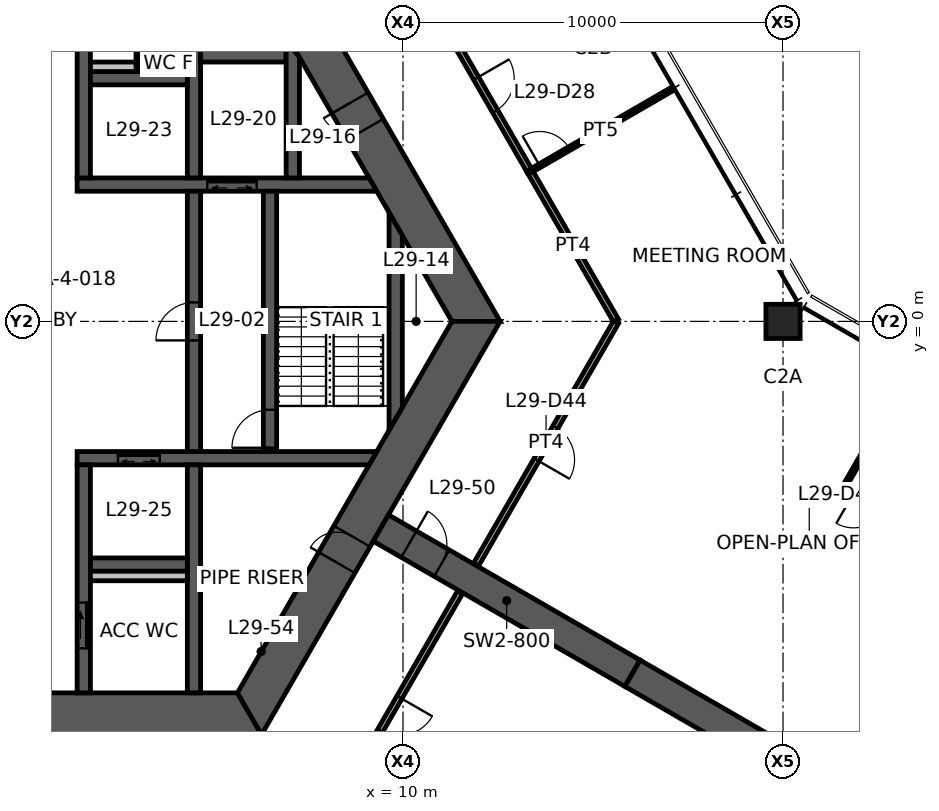
"""IFC4 building model, lengths in metres.
Left out: names, types, materials, properties, quantities, classifications, styles, units other than length and angle.
Written with IfcOpenShell. Run it as: python <this file> out.ifc"""

import sys

from ifc_helpers import new_model, si_unit, direction, frame, frame_2d, origin, origin_2d, place, context, subcontext, project, spatial, polyline, rectangle, hollow_rectangle, outline, extrude, element, fill, save


model = new_model("IFC4")
c1 = context("Model", 3, precision=1e-05, world=origin(), true_north=direction((0.0, 1.0)))
c2 = subcontext(c1, "Body", "Model", "MODEL_VIEW")
j1 = project(units=[si_unit("LENGTHUNIT", "METRE"), si_unit("PLANEANGLEUNIT", "RADIAN")], contexts=[c1])
p1 = place(None, origin())
s1 = spatial("IfcSite", under=j1, at=p1, CompositionType="ELEMENT")
p2 = place(p1, origin())
s2 = spatial("IfcBuilding", under=s1, at=p2, CompositionType="ELEMENT")
p3 = place(p2, frame((0.0, 0.0, 115.8)))
s3 = spatial("IfcBuildingStorey", under=s2, at=p3, CompositionType="ELEMENT", Elevation=115.8)
p4 = place(p3, frame((20.0, 0.0, 0.0), z_axis=(0.0, 0.0, 1.0), x_axis=(1.0, 0.0, 0.0)))
e1 = element("IfcColumn", 1, at=p4, inside=s3, PredefinedType="COLUMN", context=c2, shape_type="SweptSolid", body=[
    extrude(hollow_rectangle(XDim=0.9, YDim=0.9, WallThickness=0.055, at=origin_2d()), origin(), (0.0, 0.0, 1.0), 3.9),
])
p5 = place(p3, frame((11.922, 0.0, 0.0), z_axis=(0.0, 0.0, 1.0), x_axis=(-0.500004296715, 0.866022923061, 0.0)))
e2 = element("IfcWall", 2, at=p5, inside=s3, PredefinedType="SHEAR", context=c2, shape_type="SweptSolid", body=[
    extrude(outline(polyline([(-0.318, -0.55), (5.835, -0.55), (6.635, -0.55), (12.24, -0.55), (11.605, 0.55), (6.635, 0.55), (5.835, 0.55), (0.318, 0.55), (-0.318, -0.55)])), origin(), (0.0, 0.0, 1.0), 3.9),
])
p6 = place(p5, frame((5.835, 0.0, 0.0)))
e3 = element("IfcOpeningElement", 3, at=p6, cuts=e2, PredefinedType="OPENING", context=c2, shape_type="SweptSolid", body=[
    extrude(rectangle(XDim=0.8, YDim=2.1, at=frame_2d((0.4, 1.05))), frame((0.0, 0.56, 0.0), z_axis=(0.0, -1.0, 0.0), x_axis=(1.0, 0.0, 0.0)), (0.0, 0.0, 1.0), 1.12),
])
p7 = place(p3, frame((-5.961, -10.325, 0.0), z_axis=(0.0, 0.0, 1.0), x_axis=(1.0, 0.0, 0.0)))
e4 = element("IfcWall", 4, at=p7, inside=s3, PredefinedType="SHEAR", context=c2, shape_type="SweptSolid", body=[
    extrude(outline(polyline([(-0.318, -0.55), (5.461, -0.55), (6.461, -0.55), (12.24, -0.55), (11.605, 0.55), (6.461, 0.55), (5.461, 0.55), (0.318, 0.55), (-0.318, -0.55)])), origin(), (0.0, 0.0, 1.0), 3.9),
])
p8 = place(p7, frame((5.461, 0.0, 0.0)))
e5 = element("IfcOpeningElement", 5, at=p8, cuts=e4, PredefinedType="OPENING", context=c2, shape_type="SweptSolid", body=[
    extrude(rectangle(XDim=1.0, YDim=2.1, at=frame_2d((0.5, 1.05))), frame((0.0, 0.56, 0.0), z_axis=(0.0, -1.0, 0.0), x_axis=(1.0, 0.0, 0.0)), (0.0, 0.0, 1.0), 1.12),
])
p9 = place(p3, frame((5.961, -10.325, 0.0), z_axis=(0.0, 0.0, 1.0), x_axis=(0.500004296715, 0.866022923061, 0.0)))
e6 = element("IfcWall", 6, at=p9, inside=s3, PredefinedType="SHEAR", context=c2, shape_type="SweptSolid", body=[
    extrude(outline(polyline([(-0.318, -0.55), (4.594, -0.55), (5.394, -0.55), (12.24, -0.55), (11.605, 0.55), (5.394, 0.55), (4.594, 0.55), (0.318, 0.55), (-0.318, -0.55)])), origin(), (0.0, 0.0, 1.0), 3.9),
])
p10 = place(p9, frame((4.594, 0.0, 0.0)))
e7 = element("IfcOpeningElement", 7, at=p10, cuts=e6, PredefinedType="OPENING", context=c2, shape_type="SweptSolid", body=[
    extrude(rectangle(XDim=0.8, YDim=2.1, at=frame_2d((0.4, 1.05))), frame((0.0, 0.56, 0.0), z_axis=(0.0, -1.0, 0.0), x_axis=(1.0, 0.0, 0.0)), (0.0, 0.0, 1.0), 1.12),
])
p11 = place(p3, frame((9.418, -5.438, 0.0), z_axis=(0.0, 0.0, 1.0), x_axis=(0.866029782078, -0.499992416496, 0.0)))
e8 = element("IfcWall", 8, at=p11, inside=s3, PredefinedType="SHEAR", context=c2, shape_type="SweptSolid", body=[
    extrude(rectangle(XDim=7.646, YDim=0.8, at=frame_2d((3.823, 0.0))), origin(), (0.0, 0.0, 1.0), 3.9),
])
p12 = place(p11, frame((0.85, 0.0, 0.0)))
e9 = element("IfcOpeningElement", 9, at=p12, cuts=e8, PredefinedType="OPENING", context=c2, shape_type="SweptSolid", body=[
    extrude(rectangle(XDim=1.0, YDim=2.1, at=frame_2d((0.5, 1.05))), frame((0.0, 0.41, 0.0), z_axis=(0.0, -1.0, 0.0), x_axis=(1.0, 0.0, 0.0)), (0.0, 0.0, 1.0), 0.82),
])
p13 = place(p3, frame((16.039, -9.26, 0.0), z_axis=(0.0, 0.0, 1.0), x_axis=(0.866024837091, -0.50000098154, 0.0)))
e10 = element("IfcWall", 10, at=p13, inside=s3, PredefinedType="SHEAR", context=c2, shape_type="SweptSolid", body=[
    extrude(rectangle(XDim=13.0, YDim=0.8, at=frame_2d((6.5, 0.0))), origin(), (0.0, 0.0, 1.0), 3.9),
])
p14 = place(p3, frame((1.425, 3.6, 0.0), z_axis=(0.0, 0.0, 1.0), x_axis=(1.0, 0.0, 0.0)))
e11 = element("IfcWall", 11, at=p14, inside=s3, PredefinedType="SHEAR", context=c2, shape_type="SweptSolid", body=[
    extrude(outline(polyline([(0.0, -0.175), (3.425, -0.175), (4.725, -0.175), (7.885, -0.175), (7.683, 0.175), (4.725, 0.175), (3.425, 0.175), (0.0, 0.175), (0.0, -0.175)])), origin(), (0.0, 0.0, 1.0), 3.9),
])
p15 = place(p14, frame((3.425, 0.0, 0.0)))
e12 = element("IfcOpeningElement", 12, at=p15, cuts=e11, PredefinedType="OPENING", context=c2, shape_type="SweptSolid", body=[
    extrude(rectangle(XDim=1.3, YDim=2.1, at=frame_2d((0.65, 1.05))), frame((0.0, 0.185, 0.0), z_axis=(0.0, -1.0, 0.0), x_axis=(1.0, 0.0, 0.0)), (0.0, 0.0, 1.0), 0.37),
])
p16 = place(p3, frame((1.425, -3.6, 0.0), z_axis=(0.0, 0.0, 1.0), x_axis=(1.0, 0.0, 0.0)))
e13 = element("IfcWall", 13, at=p16, inside=s3, PredefinedType="SHEAR", context=c2, shape_type="SweptSolid", body=[
    extrude(outline(polyline([(0.0, -0.175), (1.075, -0.175), (2.175, -0.175), (7.683, -0.175), (7.885, 0.175), (2.175, 0.175), (1.075, 0.175), (0.0, 0.175), (0.0, -0.175)])), origin(), (0.0, 0.0, 1.0), 3.9),
])
p17 = place(p16, frame((1.075, 0.0, 0.0)))
e14 = element("IfcOpeningElement", 14, at=p17, cuts=e13, PredefinedType="OPENING", context=c2, shape_type="SweptSolid", body=[
    extrude(rectangle(XDim=1.1, YDim=2.1, at=frame_2d((0.55, 1.05))), frame((0.0, 0.185, 0.0), z_axis=(0.0, -1.0, 0.0), x_axis=(1.0, 0.0, 0.0)), (0.0, 0.0, 1.0), 0.37),
])
p18 = place(p3, frame((1.6, 3.775, 0.0), z_axis=(0.0, 0.0, 1.0), x_axis=(0.0, 1.0, 0.0)))
e15 = element("IfcWall", 15, at=p18, inside=s3, PredefinedType="SHEAR", context=c2, shape_type="SweptSolid", body=[
    extrude(rectangle(XDim=6.0, YDim=0.35, at=frame_2d((3.0, 0.0))), origin(), (0.0, 0.0, 1.0), 3.9),
])
p19 = place(p18, frame((3.775, 0.0, 0.0)))
e16 = element("IfcOpeningElement", 16, at=p19, cuts=e15, PredefinedType="OPENING", context=c2, shape_type="SweptSolid", body=[
    extrude(rectangle(XDim=0.9, YDim=2.1, at=frame_2d((0.45, 1.05))), frame((0.0, 0.185, 0.0), z_axis=(0.0, -1.0, 0.0), x_axis=(1.0, 0.0, 0.0)), (0.0, 0.0, 1.0), 0.37),
])
p20 = place(p3, frame((1.6, -3.775, 0.0), z_axis=(0.0, 0.0, 1.0), x_axis=(0.0, -1.0, 0.0)))
e17 = element("IfcWall", 17, at=p20, inside=s3, PredefinedType="SHEAR", context=c2, shape_type="SweptSolid", body=[
    extrude(rectangle(XDim=6.0, YDim=0.35, at=frame_2d((3.0, 0.0))), origin(), (0.0, 0.0, 1.0), 3.9),
])
p21 = place(p20, frame((3.625, 0.0, 0.0)))
e18 = element("IfcOpeningElement", 18, at=p21, cuts=e17, PredefinedType="OPENING", context=c2, shape_type="SweptSolid", body=[
    extrude(rectangle(XDim=1.2, YDim=2.1, at=frame_2d((0.6, 1.05))), frame((0.0, 0.185, 0.0), z_axis=(0.0, -1.0, 0.0), x_axis=(1.0, 0.0, 0.0)), (0.0, 0.0, 1.0), 0.37),
])
p22 = place(p3, frame((4.5, -3.425, 0.0), z_axis=(0.0, 0.0, 1.0), x_axis=(0.0, 1.0, 0.0)))
e19 = element("IfcWall", 19, at=p22, inside=s3, PredefinedType="SHEAR", context=c2, shape_type="SweptSolid", body=[
    extrude(rectangle(XDim=6.85, YDim=0.35, at=frame_2d((3.425, 0.0))), origin(), (0.0, 0.0, 1.0), 3.9),
])
p23 = place(p22, frame((2.925, 0.0, 0.0)))
e20 = element("IfcOpeningElement", 20, at=p23, cuts=e19, PredefinedType="OPENING", context=c2, shape_type="SweptSolid", body=[
    extrude(rectangle(XDim=1.0, YDim=2.1, at=frame_2d((0.5, 1.05))), frame((0.0, 0.185, 0.0), z_axis=(0.0, -1.0, 0.0), x_axis=(1.0, 0.0, 0.0)), (0.0, 0.0, 1.0), 0.37),
])
p24 = place(p3, frame((6.5, -3.425, 0.0), z_axis=(0.0, 0.0, 1.0), x_axis=(0.0, 1.0, 0.0)))
e21 = element("IfcWall", 21, at=p24, inside=s3, PredefinedType="SHEAR", context=c2, shape_type="SweptSolid", body=[
    extrude(rectangle(XDim=6.85, YDim=0.35, at=frame_2d((3.425, 0.0))), origin(), (0.0, 0.0, 1.0), 3.9),
])
p25 = place(p24, frame((0.1, 0.0, 0.0)))
e22 = element("IfcOpeningElement", 22, at=p25, cuts=e21, PredefinedType="OPENING", context=c2, shape_type="SweptSolid", body=[
    extrude(rectangle(XDim=1.0, YDim=2.1, at=frame_2d((0.5, 1.05))), frame((0.0, 0.185, 0.0), z_axis=(0.0, -1.0, 0.0), x_axis=(1.0, 0.0, 0.0)), (0.0, 0.0, 1.0), 0.37),
])
p26 = place(p3, frame((4.5, 3.775, 0.0), z_axis=(0.0, 0.0, 1.0), x_axis=(0.0, 1.0, 0.0)))
e23 = element("IfcWall", 23, at=p26, inside=s3, PredefinedType="SHEAR", context=c2, shape_type="SweptSolid", body=[
    extrude(rectangle(XDim=3.4, YDim=0.35, at=frame_2d((1.7, 0.0))), origin(), (0.0, 0.0, 1.0), 3.9),
])
p27 = place(p3, frame((4.5, -3.775, 0.0), z_axis=(0.0, 0.0, 1.0), x_axis=(0.0, -1.0, 0.0)))
e24 = element("IfcWall", 24, at=p27, inside=s3, PredefinedType="SHEAR", context=c2, shape_type="SweptSolid", body=[
    extrude(rectangle(XDim=6.0, YDim=0.35, at=frame_2d((3.0, 0.0))), origin(), (0.0, 0.0, 1.0), 3.9),
])
for number, where, z_axis, x_axis in (
    (25, (1.775, 6.4, 0.0), (0.0, 0.0, 1.0), (1.0, 0.0, 0.0)),
    (26, (1.775, -6.4, 0.0), (0.0, 0.0, 1.0), (1.0, 0.0, 0.0)),
):
    element("IfcWall", number, at=place(p3, frame(where, z_axis=z_axis, x_axis=x_axis)), inside=s3, PredefinedType="SHEAR", context=c2, shape_type="SweptSolid", body=[
        extrude(rectangle(XDim=2.55, YDim=0.35, at=frame_2d((1.275, 0.0))), origin(), (0.0, 0.0, 1.0), 3.9),
    ])
p28 = place(p3, frame((4.675, 7.0, 0.0), z_axis=(0.0, 0.0, 1.0), x_axis=(1.0, 0.0, 0.0)))
e27 = element("IfcWall", 27, at=p28, inside=s3, PredefinedType="SHEAR", context=c2, shape_type="SweptSolid", body=[
    extrude(rectangle(XDim=2.25, YDim=0.35, at=frame_2d((1.125, 0.0))), origin(), (0.0, 0.0, 1.0), 3.9),
])
p29 = place(p3, frame((7.1, 3.775, 0.0), z_axis=(0.0, 0.0, 1.0), x_axis=(0.0, 1.0, 0.0)))
e28 = element("IfcWall", 28, at=p29, inside=s3, PredefinedType="SHEAR", context=c2, shape_type="SweptSolid", body=[
    extrude(outline(polyline([(0.0, -0.175), (3.175, -0.175), (3.4, 0.0), (3.4, 0.175), (0.0, 0.175), (0.0, -0.175)])), origin(), (0.0, 0.0, 1.0), 3.9),
])
p30 = place(p3, frame((9.808, -2.562, 0.0), z_axis=(0.0, 0.0, 1.0), x_axis=(0.0, 1.0, 0.0)))
e29 = element("IfcWall", 29, at=p30, inside=s3, PredefinedType="SHEAR", context=c2, shape_type="SweptSolid", body=[
    extrude(outline(polyline([(0.303, -0.175), (4.821, -0.175), (5.428, 0.175), (-0.303, 0.175), (0.303, -0.175)])), origin(), (0.0, 0.0, 1.0), 3.9),
])
for number, where, z_axis, x_axis in (
    (30, (1.775, 6.7, 0.0), (0.0, 0.0, 1.0), (1.0, 0.0, 0.0)),
    (31, (1.775, -6.7, 0.0), (0.0, 0.0, 1.0), (1.0, 0.0, 0.0)),
):
    element("IfcWall", number, at=place(p3, frame(where, z_axis=z_axis, x_axis=x_axis)), inside=s3, PredefinedType="PLUMBINGWALL", context=c2, shape_type="SweptSolid", body=[
        extrude(rectangle(XDim=2.55, YDim=0.25, at=frame_2d((1.275, 0.0))), origin(), (0.0, 0.0, 1.0), 3.9),
    ])
p31 = place(p3, frame((3.025, 6.575, 0.0), z_axis=(0.0, 0.0, 1.0), x_axis=(0.0, 1.0, 0.0)))
e32 = element("IfcWall", 32, at=p31, inside=s3, PredefinedType="PARTITIONING", context=c2, shape_type="SweptSolid", body=[
    extrude(rectangle(XDim=3.2, YDim=0.1, at=frame_2d((1.6, 0.0))), origin(), (0.0, 0.0, 1.0), 2.95),
])
p32 = place(p31, frame((0.575, 0.0, 0.0)))
e33 = element("IfcOpeningElement", 33, at=p32, cuts=e32, PredefinedType="OPENING", context=c2, shape_type="SweptSolid", body=[
    extrude(rectangle(XDim=0.9, YDim=2.1, at=frame_2d((0.45, 1.05))), frame((0.0, 0.06, 0.0), z_axis=(0.0, -1.0, 0.0), x_axis=(1.0, 0.0, 0.0)), (0.0, 0.0, 1.0), 0.12),
])
p33 = place(p31, frame((2.1, 0.0, 0.0)))
e34 = element("IfcOpeningElement", 34, at=p33, cuts=e32, PredefinedType="OPENING", context=c2, shape_type="SweptSolid", body=[
    extrude(rectangle(XDim=0.9, YDim=2.1, at=frame_2d((0.45, 1.05))), frame((0.0, 0.06, 0.0), z_axis=(0.0, -1.0, 0.0), x_axis=(1.0, 0.0, 0.0)), (0.0, 0.0, 1.0), 0.12),
])
p34 = place(p3, frame((13.334, 3.955, 0.0), z_axis=(0.0, 0.0, 1.0), x_axis=(0.499987549055, -0.866032592222, 0.0)))
e35 = element("IfcWall", 35, at=p34, inside=s3, PredefinedType="PARTITIONING", context=c2, shape_type="SweptSolid", body=[
    extrude(rectangle(XDim=4.544, YDim=0.15, at=frame_2d((2.272, 0.0))), origin(), (0.0, 0.0, 1.0), 2.95),
])
p35 = place(p3, frame((11.011, 7.979, 0.0), z_axis=(0.0, 0.0, 1.0), x_axis=(0.500008456887, -0.866020521143, 0.0)))
e36 = element("IfcWall", 36, at=p35, inside=s3, PredefinedType="PARTITIONING", context=c2, shape_type="SweptSolid", body=[
    extrude(rectangle(XDim=4.655, YDim=0.15, at=frame_2d((2.328, 0.0))), origin(), (0.0, 0.0, 1.0), 2.95),
])
p36 = place(p35, frame((1.828, 0.0, 0.0)))
e37 = element("IfcOpeningElement", 37, at=p36, cuts=e36, PredefinedType="OPENING", context=c2, shape_type="SweptSolid", body=[
    extrude(rectangle(XDim=1.0, YDim=2.1, at=frame_2d((0.5, 1.05))), frame((0.0, 0.085, 0.0), z_axis=(0.0, -1.0, 0.0), x_axis=(1.0, 0.0, 0.0)), (0.0, 0.0, 1.0), 0.17),
])
p37 = place(p3, frame((13.338, 3.947, 0.0), z_axis=(0.0, 0.0, 1.0), x_axis=(0.865505397626, 0.500899597405, 0.0)))
e38 = element("IfcWall", 38, at=p37, inside=s3, PredefinedType="PARTITIONING", context=c2, shape_type="SweptSolid", body=[
    extrude(rectangle(XDim=4.295, YDim=0.1, at=frame_2d((2.148, 0.0))), origin(), (0.0, 0.0, 1.0), 2.95),
])
p38 = place(p37, frame((0.3, 0.0, 0.0)))
e39 = element("IfcOpeningElement", 39, at=p38, cuts=e38, PredefinedType="OPENING", context=c2, shape_type="SweptSolid", body=[
    extrude(rectangle(XDim=0.9, YDim=2.1, at=frame_2d((0.45, 1.05))), frame((0.0, 0.06, 0.0), z_axis=(0.0, -1.0, 0.0), x_axis=(1.0, 0.0, 0.0)), (0.0, 0.0, 1.0), 0.12),
])
p39 = place(p3, frame((15.606, -0.02, 0.0), z_axis=(0.0, 0.0, 1.0), x_axis=(-0.499989298045, -0.866031582473, 0.0)))
e40 = element("IfcWall", 40, at=p39, inside=s3, PredefinedType="PARTITIONING", context=c2, shape_type="SweptSolid", body=[
    extrude(rectangle(XDim=7.365, YDim=0.15, at=frame_2d((3.683, 0.0))), origin(), (0.0, 0.0, 1.0), 2.95),
])
p40 = place(p39, frame((3.183, 0.0, 0.0)))
e41 = element("IfcOpeningElement", 41, at=p40, cuts=e40, PredefinedType="OPENING", context=c2, shape_type="SweptSolid", body=[
    extrude(rectangle(XDim=1.0, YDim=2.1, at=frame_2d((0.5, 1.05))), frame((0.0, 0.085, 0.0), z_axis=(0.0, -1.0, 0.0), x_axis=(1.0, 0.0, 0.0)), (0.0, 0.0, 1.0), 0.17),
])
p41 = place(p3, frame((21.592, -4.383, 0.0), z_axis=(0.0, 0.0, 1.0), x_axis=(0.500009906705, 0.86601968407, 0.0)))
e42 = element("IfcWall", 42, at=p41, inside=s3, PredefinedType="PARTITIONING", context=c2, shape_type="SweptSolid", body=[
    extrude(rectangle(XDim=3.48, YDim=0.1, at=frame_2d((1.74, 0.0))), origin(), (0.0, 0.0, 1.0), 2.95),
])
p42 = place(p3, frame((27.327, -7.69, 0.0), z_axis=(0.0, 0.0, 1.0), x_axis=(-0.866318796728, 0.499491483847, 0.0)))
e43 = element("IfcWall", 43, at=p42, inside=s3, PredefinedType="PARTITIONING", context=c2, shape_type="SweptSolid", body=[
    extrude(rectangle(XDim=6.62, YDim=0.1, at=frame_2d((3.31, 0.0))), origin(), (0.0, 0.0, 1.0), 2.95),
])
p43 = place(p42, frame((5.42, 0.0, 0.0)))
e44 = element("IfcOpeningElement", 44, at=p43, cuts=e43, PredefinedType="OPENING", context=c2, shape_type="SweptSolid", body=[
    extrude(rectangle(XDim=0.9, YDim=2.1, at=frame_2d((0.45, 1.05))), frame((0.0, 0.06, 0.0), z_axis=(0.0, -1.0, 0.0), x_axis=(1.0, 0.0, 0.0)), (0.0, 0.0, 1.0), 0.12),
])
p44 = place(p3, frame((11.503, -7.126, 0.0), z_axis=(0.0, 0.0, 1.0), x_axis=(-0.500005620463, -0.866022158784, 0.0)))
e45 = element("IfcWall", 45, at=p44, inside=s3, PredefinedType="PARTITIONING", context=c2, shape_type="SweptSolid", body=[
    extrude(rectangle(XDim=7.389, YDim=0.15, at=frame_2d((3.694, 0.0))), origin(), (0.0, 0.0, 1.0), 2.95),
])
p45 = place(p44, frame((3.194, 0.0, 0.0)))
e46 = element("IfcOpeningElement", 46, at=p45, cuts=e45, PredefinedType="OPENING", context=c2, shape_type="SweptSolid", body=[
    extrude(rectangle(XDim=1.0, YDim=2.1, at=frame_2d((0.5, 1.05))), frame((0.0, 0.085, 0.0), z_axis=(0.0, -1.0, 0.0), x_axis=(1.0, 0.0, 0.0)), (0.0, 0.0, 1.0), 0.17),
])
p46 = place(p6, origin())
e47 = element("IfcDoor", 47, at=p46, inside=s3, OperationType="SINGLE_SWING_RIGHT", PredefinedType="DOOR", context=c2, shape_type="SweptSolid", body=[
    extrude(rectangle(XDim=0.8, YDim=2.1, at=frame_2d((0.4, 1.05))), frame((0.0, 0.025, 0.0), z_axis=(0.0, -1.0, 0.0), x_axis=(1.0, 0.0, 0.0)), (0.0, 0.0, 1.0), 0.05),
])
fill(e3, e47)
p47 = place(p10, origin())
e48 = element("IfcDoor", 48, at=p47, inside=s3, OperationType="SINGLE_SWING_LEFT", PredefinedType="DOOR", context=c2, shape_type="SweptSolid", body=[
    extrude(rectangle(XDim=0.8, YDim=2.1, at=frame_2d((0.4, 1.05))), frame((0.0, 0.025, 0.0), z_axis=(0.0, -1.0, 0.0), x_axis=(1.0, 0.0, 0.0)), (0.0, 0.0, 1.0), 0.05),
])
fill(e7, e48)
p48 = place(p23, origin())
e49 = element("IfcDoor", 49, at=p48, inside=s3, OperationType="SINGLE_SWING_LEFT", PredefinedType="DOOR", context=c2, shape_type="SweptSolid", body=[
    extrude(rectangle(XDim=1.0, YDim=2.1, at=frame_2d((0.5, 1.05))), frame((0.0, 0.025, 0.0), z_axis=(0.0, -1.0, 0.0), x_axis=(1.0, 0.0, 0.0)), (0.0, 0.0, 1.0), 0.05),
])
fill(e20, e49)
p49 = place(p25, origin())
e50 = element("IfcDoor", 50, at=p49, inside=s3, OperationType="SINGLE_SWING_LEFT", PredefinedType="DOOR", context=c2, shape_type="SweptSolid", body=[
    extrude(rectangle(XDim=1.0, YDim=2.1, at=frame_2d((0.5, 1.05))), frame((0.0, 0.025, 0.0), z_axis=(0.0, -1.0, 0.0), x_axis=(1.0, 0.0, 0.0)), (0.0, 0.0, 1.0), 0.05),
])
fill(e22, e50)
p50 = place(p21, origin())
e51 = element("IfcDoor", 51, at=p50, inside=s3, OperationType="SLIDING_TO_LEFT", PredefinedType="DOOR", context=c2, shape_type="SweptSolid", body=[
    extrude(rectangle(XDim=1.2, YDim=2.1, at=frame_2d((0.6, 1.05))), frame((0.0, 0.025, 0.0), z_axis=(0.0, -1.0, 0.0), x_axis=(1.0, 0.0, 0.0)), (0.0, 0.0, 1.0), 0.05),
])
fill(e18, e51)
p51 = place(p12, origin())
e52 = element("IfcDoor", 52, at=p51, inside=s3, OperationType="SINGLE_SWING_LEFT", PredefinedType="DOOR", context=c2, shape_type="SweptSolid", body=[
    extrude(rectangle(XDim=1.0, YDim=2.1, at=frame_2d((0.5, 1.05))), frame((0.0, 0.025, 0.0), z_axis=(0.0, -1.0, 0.0), x_axis=(1.0, 0.0, 0.0)), (0.0, 0.0, 1.0), 0.05),
])
fill(e9, e52)
p52 = place(p36, origin())
e53 = element("IfcDoor", 53, at=p52, inside=s3, OperationType="SINGLE_SWING_LEFT", PredefinedType="DOOR", context=c2, shape_type="SweptSolid", body=[
    extrude(rectangle(XDim=1.0, YDim=2.1, at=frame_2d((0.5, 1.05))), frame((0.0, 0.025, 0.0), z_axis=(0.0, -1.0, 0.0), x_axis=(1.0, 0.0, 0.0)), (0.0, 0.0, 1.0), 0.05),
])
fill(e37, e53)
p53 = place(p38, origin())
e54 = element("IfcDoor", 54, at=p53, inside=s3, OperationType="SINGLE_SWING_LEFT", PredefinedType="DOOR", context=c2, shape_type="SweptSolid", body=[
    extrude(rectangle(XDim=0.9, YDim=2.1, at=frame_2d((0.45, 1.05))), frame((0.0, 0.025, 0.0), z_axis=(0.0, -1.0, 0.0), x_axis=(1.0, 0.0, 0.0)), (0.0, 0.0, 1.0), 0.05),
])
fill(e39, e54)
p54 = place(p40, origin())
e55 = element("IfcDoor", 55, at=p54, inside=s3, OperationType="SINGLE_SWING_RIGHT", PredefinedType="DOOR", context=c2, shape_type="SweptSolid", body=[
    extrude(rectangle(XDim=1.0, YDim=2.1, at=frame_2d((0.5, 1.05))), frame((0.0, 0.025, 0.0), z_axis=(0.0, -1.0, 0.0), x_axis=(1.0, 0.0, 0.0)), (0.0, 0.0, 1.0), 0.05),
])
fill(e41, e55)
p55 = place(p43, origin())
e56 = element("IfcDoor", 56, at=p55, inside=s3, OperationType="SINGLE_SWING_RIGHT", PredefinedType="DOOR", context=c2, shape_type="SweptSolid", body=[
    extrude(rectangle(XDim=0.9, YDim=2.1, at=frame_2d((0.45, 1.05))), frame((0.0, 0.025, 0.0), z_axis=(0.0, -1.0, 0.0), x_axis=(1.0, 0.0, 0.0)), (0.0, 0.0, 1.0), 0.05),
])
fill(e44, e56)
p56 = place(p45, origin())
e57 = element("IfcDoor", 57, at=p56, inside=s3, OperationType="SINGLE_SWING_LEFT", PredefinedType="DOOR", context=c2, shape_type="SweptSolid", body=[
    extrude(rectangle(XDim=1.0, YDim=2.1, at=frame_2d((0.5, 1.05))), frame((0.0, 0.025, 0.0), z_axis=(0.0, -1.0, 0.0), x_axis=(1.0, 0.0, 0.0)), (0.0, 0.0, 1.0), 0.05),
])
fill(e46, e57)
p57 = place(p17, origin())
e58 = element("IfcDoor", 58, at=p57, inside=s3, OperationType="DOUBLE_DOOR_SLIDING", PredefinedType="DOOR", context=c2, shape_type="SweptSolid", body=[
    extrude(rectangle(XDim=1.1, YDim=2.1, at=frame_2d((0.55, 1.05))), frame((0.0, 0.025, 0.0), z_axis=(0.0, -1.0, 0.0), x_axis=(1.0, 0.0, 0.0)), (0.0, 0.0, 1.0), 0.05),
])
fill(e14, e58)
p58 = place(p15, origin())
e59 = element("IfcDoor", 59, at=p58, inside=s3, OperationType="DOUBLE_DOOR_SLIDING", PredefinedType="DOOR", context=c2, shape_type="SweptSolid", body=[
    extrude(rectangle(XDim=1.3, YDim=2.1, at=frame_2d((0.65, 1.05))), frame((0.0, 0.025, 0.0), z_axis=(0.0, -1.0, 0.0), x_axis=(1.0, 0.0, 0.0)), (0.0, 0.0, 1.0), 0.05),
])
fill(e12, e59)
save(model, sys.argv[1])
